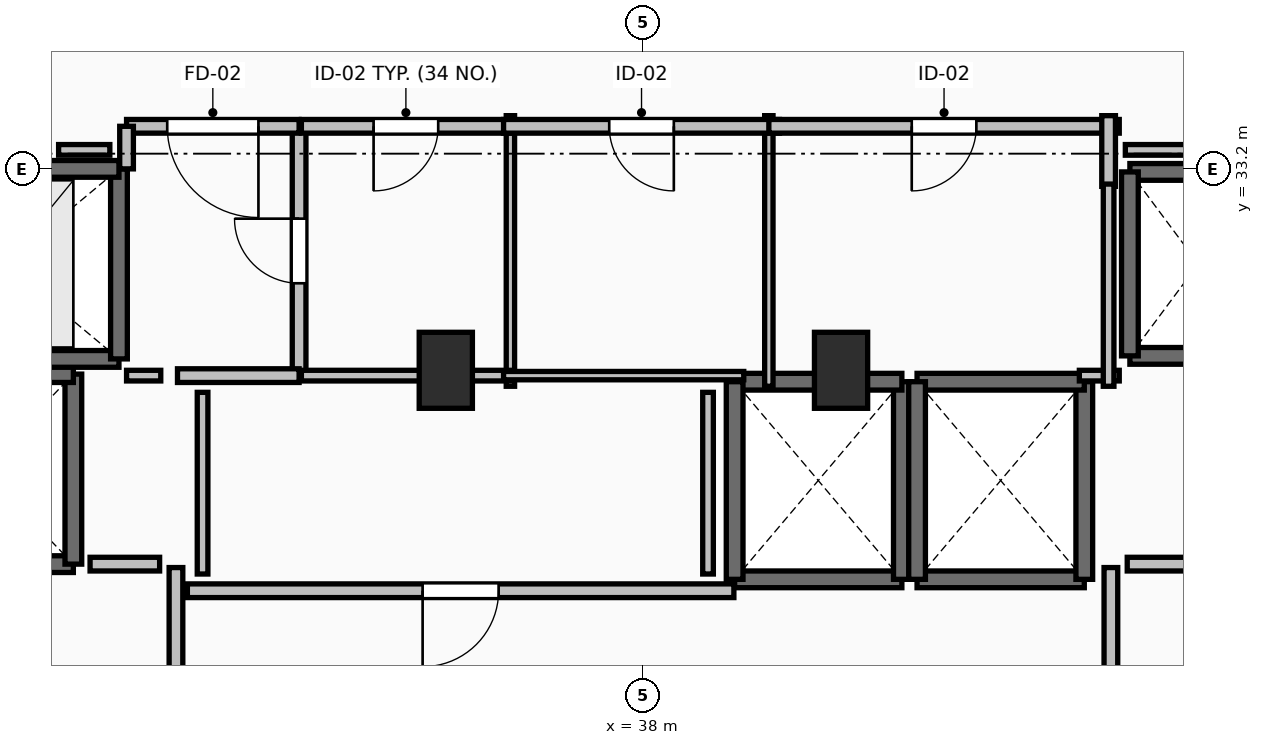
"""IFC4 building model, lengths in metres.
Left out: names, types, materials, properties, quantities, classifications, styles, units other than length and angle.
Written with IfcOpenShell. Run it as: python <this file> out.ifc"""

import sys

from ifc_helpers import new_model, si_unit, direction, frame, frame_2d, origin, origin_2d, place, context, subcontext, project, spatial, rectangle, extrude, element, fill, save


model = new_model("IFC4")
c1 = context("Model", 3, precision=1e-05, world=origin(), true_north=direction((0.0, 1.0)))
c2 = subcontext(c1, "Body", "Model", "MODEL_VIEW")
j1 = project(units=[si_unit("LENGTHUNIT", "METRE"), si_unit("PLANEANGLEUNIT", "RADIAN")], contexts=[c1])
p1 = place(None, origin())
s1 = spatial("IfcSite", under=j1, at=p1, CompositionType="ELEMENT")
p2 = place(p1, origin())
s2 = spatial("IfcBuilding", under=s1, at=p2, CompositionType="ELEMENT")
p3 = place(p2, frame((0.0, 0.0, 221.4)))
s3 = spatial("IfcBuildingStorey", under=s2, at=p3, CompositionType="ELEMENT", Elevation=221.4)
for number, where, z_axis, x_axis in (
    (1, (35.4, 30.55, 0.0), (0.0, 0.0, 1.0), (1.0, 0.0, 0.0)),
    (2, (40.6, 30.55, 0.0), (0.0, 0.0, 1.0), (1.0, 0.0, 0.0)),
):
    element("IfcColumn", number, at=place(p3, frame(where, z_axis=z_axis, x_axis=x_axis)), inside=s3, PredefinedType="PILASTER", context=c2, shape_type="SweptSolid", body=[
        extrude(rectangle(XDim=0.7, YDim=1.0, at=origin_2d()), origin(), (0.0, 0.0, 1.0), 3.55),
    ])
p4 = place(p3, frame((39.2, 27.8, 0.0), z_axis=(0.0, 0.0, 1.0), x_axis=(1.0, 0.0, 0.0)))
e3 = element("IfcWall", 3, at=p4, inside=s3, PredefinedType="SOLIDWALL", context=c2, shape_type="SweptSolid", body=[
    extrude(rectangle(XDim=2.2, YDim=0.22, at=frame_2d((1.1, 0.0))), origin(), (0.0, 0.0, 1.0), 3.2),
])
p5 = place(p3, frame((41.4, 27.8, 0.0), z_axis=(0.0, 0.0, 1.0), x_axis=(0.0, 1.0, 0.0)))
e4 = element("IfcWall", 4, at=p5, inside=s3, PredefinedType="SOLIDWALL", context=c2, shape_type="SweptSolid", body=[
    extrude(rectangle(XDim=2.6, YDim=0.22, at=frame_2d((1.3, 0.0))), origin(), (0.0, 0.0, 1.0), 3.2),
])
p6 = place(p3, frame((41.4, 30.4, 0.0), z_axis=(0.0, 0.0, 1.0), x_axis=(-1.0, 0.0, 0.0)))
e5 = element("IfcWall", 5, at=p6, inside=s3, PredefinedType="SOLIDWALL", context=c2, shape_type="SweptSolid", body=[
    extrude(rectangle(XDim=2.2, YDim=0.22, at=frame_2d((1.1, 0.0))), origin(), (0.0, 0.0, 1.0), 3.2),
])
p7 = place(p3, frame((39.2, 30.4, 0.0), z_axis=(0.0, 0.0, 1.0), x_axis=(0.0, -1.0, 0.0)))
e6 = element("IfcWall", 6, at=p7, inside=s3, PredefinedType="SOLIDWALL", context=c2, shape_type="SweptSolid", body=[
    extrude(rectangle(XDim=2.6, YDim=0.22, at=frame_2d((1.3, 0.0))), origin(), (0.0, 0.0, 1.0), 3.2),
])
p8 = place(p3, frame((41.6, 27.8, 0.0), z_axis=(0.0, 0.0, 1.0), x_axis=(1.0, 0.0, 0.0)))
e7 = element("IfcWall", 7, at=p8, inside=s3, PredefinedType="SOLIDWALL", context=c2, shape_type="SweptSolid", body=[
    extrude(rectangle(XDim=2.2, YDim=0.22, at=frame_2d((1.1, 0.0))), origin(), (0.0, 0.0, 1.0), 3.2),
])
p9 = place(p3, frame((43.8, 27.8, 0.0), z_axis=(0.0, 0.0, 1.0), x_axis=(0.0, 1.0, 0.0)))
e8 = element("IfcWall", 8, at=p9, inside=s3, PredefinedType="SOLIDWALL", context=c2, shape_type="SweptSolid", body=[
    extrude(rectangle(XDim=2.6, YDim=0.22, at=frame_2d((1.3, 0.0))), origin(), (0.0, 0.0, 1.0), 3.2),
])
p10 = place(p3, frame((43.8, 30.4, 0.0), z_axis=(0.0, 0.0, 1.0), x_axis=(-1.0, 0.0, 0.0)))
e9 = element("IfcWall", 9, at=p10, inside=s3, PredefinedType="SOLIDWALL", context=c2, shape_type="SweptSolid", body=[
    extrude(rectangle(XDim=2.2, YDim=0.22, at=frame_2d((1.1, 0.0))), origin(), (0.0, 0.0, 1.0), 3.2),
])
p11 = place(p3, frame((41.6, 30.4, 0.0), z_axis=(0.0, 0.0, 1.0), x_axis=(0.0, -1.0, 0.0)))
e10 = element("IfcWall", 10, at=p11, inside=s3, PredefinedType="SOLIDWALL", context=c2, shape_type="SweptSolid", body=[
    extrude(rectangle(XDim=2.6, YDim=0.22, at=frame_2d((1.3, 0.0))), origin(), (0.0, 0.0, 1.0), 3.2),
])
for number, where, z_axis, x_axis in (
    (11, (44.4, 30.74, 0.0), (0.0, 0.0, 1.0), (1.0, 0.0, 0.0)),
    (12, (46.2, 33.16, 0.0), (0.0, 0.0, 1.0), (-1.0, 0.0, 0.0)),
):
    element("IfcWall", number, at=place(p3, frame(where, z_axis=z_axis, x_axis=x_axis)), inside=s3, PredefinedType="SOLIDWALL", context=c2, shape_type="SweptSolid", body=[
        extrude(rectangle(XDim=1.8, YDim=0.22, at=frame_2d((0.9, 0.0))), origin(), (0.0, 0.0, 1.0), 3.2),
    ])
p12 = place(p3, frame((44.4, 33.16, 0.0), z_axis=(0.0, 0.0, 1.0), x_axis=(0.0, -1.0, 0.0)))
e13 = element("IfcWall", 13, at=p12, inside=s3, PredefinedType="SOLIDWALL", context=c2, shape_type="SweptSolid", body=[
    extrude(rectangle(XDim=2.42, YDim=0.22, at=frame_2d((1.21, 0.0))), origin(), (0.0, 0.0, 1.0), 3.2),
])
p13 = place(p3, frame((28.1, 28.0, 0.0), z_axis=(0.0, 0.0, 1.0), x_axis=(1.0, 0.0, 0.0)))
e14 = element("IfcWall", 14, at=p13, inside=s3, PredefinedType="SHEAR", context=c2, shape_type="SweptSolid", body=[
    extrude(rectangle(XDim=2.4, YDim=0.22, at=frame_2d((1.2, 0.0))), origin(), (0.0, 0.0, 1.0), 3.2),
])
p14 = place(p13, frame((0.6, 0.0, 0.0)))
e15 = element("IfcOpeningElement", 15, at=p14, cuts=e14, PredefinedType="OPENING", context=c2, shape_type="SweptSolid", body=[
    extrude(rectangle(XDim=1.2, YDim=2.2, at=frame_2d((0.6, 1.1))), frame((0.0, 0.125, 0.0), z_axis=(0.0, -1.0, 0.0), x_axis=(1.0, 0.0, 0.0)), (0.0, 0.0, 1.0), 0.25),
])
p15 = place(p3, frame((30.5, 28.0, 0.0), z_axis=(0.0, 0.0, 1.0), x_axis=(0.0, 1.0, 0.0)))
e16 = element("IfcWall", 16, at=p15, inside=s3, PredefinedType="SHEAR", context=c2, shape_type="SweptSolid", body=[
    extrude(rectangle(XDim=2.5, YDim=0.22, at=frame_2d((1.25, 0.0))), origin(), (0.0, 0.0, 1.0), 3.2),
])
p16 = place(p3, frame((30.5, 30.5, 0.0), z_axis=(0.0, 0.0, 1.0), x_axis=(-1.0, 0.0, 0.0)))
e17 = element("IfcWall", 17, at=p16, inside=s3, PredefinedType="SHEAR", context=c2, shape_type="SweptSolid", body=[
    extrude(rectangle(XDim=2.4, YDim=0.22, at=frame_2d((1.2, 0.0))), origin(), (0.0, 0.0, 1.0), 3.2),
])
p17 = place(p3, frame((28.1, 30.7, 0.0), z_axis=(0.0, 0.0, 1.0), x_axis=(1.0, 0.0, 0.0)))
e18 = element("IfcWall", 18, at=p17, inside=s3, PredefinedType="SOLIDWALL", context=c2, shape_type="SweptSolid", body=[
    extrude(rectangle(XDim=3.0, YDim=0.22, at=frame_2d((1.5, 0.0))), origin(), (0.0, 0.0, 1.0), 3.2),
])
p18 = place(p3, frame((31.1, 30.7, 0.0), z_axis=(0.0, 0.0, 1.0), x_axis=(0.0, 1.0, 0.0)))
e19 = element("IfcWall", 19, at=p18, inside=s3, PredefinedType="SOLIDWALL", context=c2, shape_type="SweptSolid", body=[
    extrude(rectangle(XDim=2.5, YDim=0.22, at=frame_2d((1.25, 0.0))), origin(), (0.0, 0.0, 1.0), 3.2),
])
p19 = place(p3, frame((31.1, 33.2, 0.0), z_axis=(0.0, 0.0, 1.0), x_axis=(-1.0, 0.0, 0.0)))
e20 = element("IfcWall", 20, at=p19, inside=s3, PredefinedType="SOLIDWALL", context=c2, shape_type="SweptSolid", body=[
    extrude(rectangle(XDim=3.0, YDim=0.22, at=frame_2d((1.5, 0.0))), origin(), (0.0, 0.0, 1.0), 3.2),
])
p20 = place(p19, frame((0.9, 0.0, 0.0)))
e21 = element("IfcOpeningElement", 21, at=p20, cuts=e20, PredefinedType="OPENING", context=c2, shape_type="SweptSolid", body=[
    extrude(rectangle(XDim=1.2, YDim=2.2, at=frame_2d((0.6, 1.1))), frame((0.0, 0.125, 0.0), z_axis=(0.0, -1.0, 0.0), x_axis=(1.0, 0.0, 0.0)), (0.0, 0.0, 1.0), 0.25),
])
p21 = place(p3, frame((31.85, 24.045, 0.0), z_axis=(0.0, 0.0, 1.0), x_axis=(0.0, 1.0, 0.0)))
e22 = element("IfcWall", 22, at=p21, inside=s3, PredefinedType="PARTITIONING", context=c2, shape_type="SweptSolid", body=[
    extrude(rectangle(XDim=3.91, YDim=0.18, at=frame_2d((1.955, 0.0))), origin(), (0.0, 0.0, 1.0), 3.2),
])
p22 = place(p21, frame((1.355, 0.0, 0.0)))
e23 = element("IfcOpeningElement", 23, at=p22, cuts=e22, PredefinedType="OPENING", context=c2, shape_type="SweptSolid", body=[
    extrude(rectangle(XDim=1.2, YDim=2.15, at=frame_2d((0.6, 1.075))), frame((0.0, 0.105, 0.0), z_axis=(0.0, -1.0, 0.0), x_axis=(1.0, 0.0, 0.0)), (0.0, 0.0, 1.0), 0.21),
])
p23 = place(p3, frame((44.15, 27.955, 0.0), z_axis=(0.0, 0.0, 1.0), x_axis=(0.0, -1.0, 0.0)))
e24 = element("IfcWall", 24, at=p23, inside=s3, PredefinedType="PARTITIONING", context=c2, shape_type="SweptSolid", body=[
    extrude(rectangle(XDim=3.91, YDim=0.18, at=frame_2d((1.955, 0.0))), origin(), (0.0, 0.0, 1.0), 3.2),
])
p24 = place(p23, frame((1.355, 0.0, 0.0)))
e25 = element("IfcOpeningElement", 25, at=p24, cuts=e24, PredefinedType="OPENING", context=c2, shape_type="SweptSolid", body=[
    extrude(rectangle(XDim=1.2, YDim=2.15, at=frame_2d((0.6, 1.075))), frame((0.0, 0.105, 0.0), z_axis=(0.0, -1.0, 0.0), x_axis=(1.0, 0.0, 0.0)), (0.0, 0.0, 1.0), 0.21),
])
p25 = place(p3, frame((33.47, 30.48, 0.0), z_axis=(0.0, 0.0, 1.0), x_axis=(0.0, 1.0, 0.0)))
e26 = element("IfcWall", 26, at=p25, inside=s3, PredefinedType="PARTITIONING", context=c2, shape_type="SweptSolid", body=[
    extrude(rectangle(XDim=3.28, YDim=0.18, at=frame_2d((1.64, 0.0))), origin(), (0.0, 0.0, 1.0), 3.2),
])
p26 = place(p25, frame((1.215, 0.0, 0.0)))
e27 = element("IfcOpeningElement", 27, at=p26, cuts=e26, PredefinedType="OPENING", context=c2, shape_type="SweptSolid", body=[
    extrude(rectangle(XDim=0.85, YDim=2.1, at=frame_2d((0.425, 1.05))), frame((0.0, 0.105, 0.0), z_axis=(0.0, -1.0, 0.0), x_axis=(1.0, 0.0, 0.0)), (0.0, 0.0, 1.0), 0.21),
])
p27 = place(p3, frame((31.87, 30.48, 0.0), z_axis=(0.0, 0.0, 1.0), x_axis=(1.0, 0.0, 0.0)))
e28 = element("IfcWall", 28, at=p27, inside=s3, PredefinedType="PARTITIONING", context=c2, shape_type="SweptSolid", body=[
    extrude(rectangle(XDim=1.6, YDim=0.18, at=frame_2d((0.8, 0.0))), origin(), (0.0, 0.0, 1.0), 3.2),
])
p28 = place(p3, frame((33.47, 33.76, 0.0), z_axis=(0.0, 0.0, 1.0), x_axis=(-1.0, 0.0, 0.0)))
e29 = element("IfcWall", 29, at=p28, inside=s3, PredefinedType="PARTITIONING", context=c2, shape_type="SweptSolid", body=[
    extrude(rectangle(XDim=2.27, YDim=0.18, at=frame_2d((1.135, 0.0))), origin(), (0.0, 0.0, 1.0), 3.2),
])
p29 = place(p28, frame((0.535, 0.0, 0.0)))
e30 = element("IfcOpeningElement", 30, at=p29, cuts=e29, PredefinedType="OPENING", context=c2, shape_type="SweptSolid", body=[
    extrude(rectangle(XDim=1.2, YDim=2.15, at=frame_2d((0.6, 1.075))), frame((0.0, 0.105, 0.0), z_axis=(0.0, -1.0, 0.0), x_axis=(1.0, 0.0, 0.0)), (0.0, 0.0, 1.0), 0.21),
])
p30 = place(p3, frame((31.2, 33.76, 0.0), z_axis=(0.0, 0.0, 1.0), x_axis=(0.0, -1.0, 0.0)))
e31 = element("IfcWall", 31, at=p30, inside=s3, PredefinedType="PARTITIONING", context=c2, shape_type="SweptSolid", body=[
    extrude(rectangle(XDim=0.56, YDim=0.18, at=frame_2d((0.28, 0.0))), origin(), (0.0, 0.0, 1.0), 3.2),
])
p31 = place(p3, frame((39.19, 27.65, 0.0), z_axis=(0.0, 0.0, 1.0), x_axis=(-1.0, 0.0, 0.0)))
e32 = element("IfcWall", 32, at=p31, inside=s3, PredefinedType="PARTITIONING", context=c2, shape_type="SweptSolid", body=[
    extrude(rectangle(XDim=7.19, YDim=0.18, at=frame_2d((3.595, 0.0))), origin(), (0.0, 0.0, 1.0), 3.2),
])
p32 = place(p31, frame((3.095, 0.0, 0.0)))
e33 = element("IfcOpeningElement", 33, at=p32, cuts=e32, PredefinedType="OPENING", context=c2, shape_type="SweptSolid", body=[
    extrude(rectangle(XDim=1.0, YDim=2.15, at=frame_2d((0.5, 1.075))), frame((0.0, 0.105, 0.0), z_axis=(0.0, -1.0, 0.0), x_axis=(1.0, 0.0, 0.0)), (0.0, 0.0, 1.0), 0.21),
])
p33 = place(p3, frame((36.25, 30.34, 0.0), z_axis=(0.0, 0.0, 1.0), x_axis=(0.0, 1.0, 0.0)))
e34 = element("IfcWall", 34, at=p33, inside=s3, PredefinedType="PARTITIONING", context=c2, shape_type="SweptSolid", body=[
    extrude(rectangle(XDim=3.56, YDim=0.11, at=frame_2d((1.78, 0.0))), origin(), (0.0, 0.0, 1.0), 2.392),
])
p34 = place(p3, frame((33.5, 30.48, 0.0), z_axis=(0.0, 0.0, 1.0), x_axis=(1.0, 0.0, 0.0)))
e35 = element("IfcWall", 35, at=p34, inside=s3, PredefinedType="PARTITIONING", context=c2, shape_type="SweptSolid", body=[
    extrude(rectangle(XDim=2.75, YDim=0.14, at=frame_2d((1.375, 0.0))), origin(), (0.0, 0.0, 1.0), 2.392),
])
p35 = place(p3, frame((36.25, 33.76, 0.0), z_axis=(0.0, 0.0, 1.0), x_axis=(-1.0, 0.0, 0.0)))
e36 = element("IfcWall", 36, at=p35, inside=s3, PredefinedType="PARTITIONING", context=c2, shape_type="SweptSolid", body=[
    extrude(rectangle(XDim=2.75, YDim=0.18, at=frame_2d((1.375, 0.0))), origin(), (0.0, 0.0, 1.0), 3.2),
])
p36 = place(p35, frame((0.95, 0.0, 0.0)))
e37 = element("IfcOpeningElement", 37, at=p36, cuts=e36, PredefinedType="OPENING", context=c2, shape_type="SweptSolid", body=[
    extrude(rectangle(XDim=0.85, YDim=2.1, at=frame_2d((0.425, 1.05))), frame((0.0, 0.105, 0.0), z_axis=(0.0, -1.0, 0.0), x_axis=(1.0, 0.0, 0.0)), (0.0, 0.0, 1.0), 0.21),
])
p37 = place(p3, frame((39.65, 30.34, 0.0), z_axis=(0.0, 0.0, 1.0), x_axis=(0.0, 1.0, 0.0)))
e38 = element("IfcWall", 38, at=p37, inside=s3, PredefinedType="PARTITIONING", context=c2, shape_type="SweptSolid", body=[
    extrude(rectangle(XDim=3.56, YDim=0.11, at=frame_2d((1.78, 0.0))), origin(), (0.0, 0.0, 1.0), 2.392),
])
p38 = place(p3, frame((36.16, 30.48, 0.0), z_axis=(0.0, 0.0, 1.0), x_axis=(1.0, 0.0, 0.0)))
e39 = element("IfcWall", 39, at=p38, inside=s3, PredefinedType="PARTITIONING", context=c2, shape_type="SweptSolid", body=[
    extrude(rectangle(XDim=3.16, YDim=0.11, at=frame_2d((1.58, 0.0))), origin(), (0.0, 0.0, 1.0), 2.392),
])
p39 = place(p3, frame((39.79, 33.76, 0.0), z_axis=(0.0, 0.0, 1.0), x_axis=(-1.0, 0.0, 0.0)))
e40 = element("IfcWall", 40, at=p39, inside=s3, PredefinedType="PARTITIONING", context=c2, shape_type="SweptSolid", body=[
    extrude(rectangle(XDim=3.63, YDim=0.18, at=frame_2d((1.815, 0.0))), origin(), (0.0, 0.0, 1.0), 3.2),
])
p40 = place(p39, frame((1.39, 0.0, 0.0)))
e41 = element("IfcOpeningElement", 41, at=p40, cuts=e40, PredefinedType="OPENING", context=c2, shape_type="SweptSolid", body=[
    extrude(rectangle(XDim=0.85, YDim=2.1, at=frame_2d((0.425, 1.05))), frame((0.0, 0.105, 0.0), z_axis=(0.0, -1.0, 0.0), x_axis=(1.0, 0.0, 0.0)), (0.0, 0.0, 1.0), 0.21),
])
p41 = place(p3, frame((44.26, 33.76, 0.0), z_axis=(0.0, 0.0, 1.0), x_axis=(-1.0, 0.0, 0.0)))
e42 = element("IfcWall", 42, at=p41, inside=s3, PredefinedType="PARTITIONING", context=c2, shape_type="SweptSolid", body=[
    extrude(rectangle(XDim=4.61, YDim=0.18, at=frame_2d((2.305, 0.0))), origin(), (0.0, 0.0, 1.0), 3.2),
])
p42 = place(p41, frame((1.88, 0.0, 0.0)))
e43 = element("IfcOpeningElement", 43, at=p42, cuts=e42, PredefinedType="OPENING", context=c2, shape_type="SweptSolid", body=[
    extrude(rectangle(XDim=0.85, YDim=2.1, at=frame_2d((0.425, 1.05))), frame((0.0, 0.105, 0.0), z_axis=(0.0, -1.0, 0.0), x_axis=(1.0, 0.0, 0.0)), (0.0, 0.0, 1.0), 0.21),
])
p43 = place(p3, frame((44.12, 32.97, 0.0), z_axis=(0.0, 0.0, 1.0), x_axis=(0.0, 1.0, 0.0)))
e44 = element("IfcWall", 44, at=p43, inside=s3, PredefinedType="PARTITIONING", context=c2, shape_type="SweptSolid", body=[
    extrude(rectangle(XDim=0.93, YDim=0.18, at=frame_2d((0.465, 0.0))), origin(), (0.0, 0.0, 1.0), 3.2),
])
for number, where, z_axis, x_axis in (
    (45, (31.635, 28.0, 0.0), (0.0, 0.0, 1.0), (-1.0, 0.0, 0.0)),
    (46, (45.28, 28.0, 0.0), (0.0, 0.0, 1.0), (-1.0, 0.0, 0.0)),
):
    element("IfcWall", number, at=place(p3, frame(where, z_axis=z_axis, x_axis=x_axis)), inside=s3, PredefinedType="PARTITIONING", context=c2, shape_type="SweptSolid", body=[
        extrude(rectangle(XDim=0.915, YDim=0.18, at=frame_2d((0.458, 0.0))), origin(), (0.0, 0.0, 1.0), 3.2),
    ])
p44 = place(p3, frame((31.2, 30.48, 0.0), z_axis=(0.0, 0.0, 1.0), x_axis=(1.0, 0.0, 0.0)))
e47 = element("IfcWall", 47, at=p44, inside=s3, PredefinedType="PARTITIONING", context=c2, shape_type="SweptSolid", body=[
    extrude(rectangle(XDim=0.45, YDim=0.14, at=frame_2d((0.225, 0.0))), origin(), (0.0, 0.0, 1.0), 3.2),
])
p45 = place(p3, frame((43.735, 30.48, 0.0), z_axis=(0.0, 0.0, 1.0), x_axis=(1.0, 0.0, 0.0)))
e48 = element("IfcWall", 48, at=p45, inside=s3, PredefinedType="PARTITIONING", context=c2, shape_type="SweptSolid", body=[
    extrude(rectangle(XDim=0.525, YDim=0.14, at=frame_2d((0.262, 0.0))), origin(), (0.0, 0.0, 1.0), 3.2),
])
p46 = place(p3, frame((44.12, 30.34, 0.0), z_axis=(0.0, 0.0, 1.0), x_axis=(0.0, 1.0, 0.0)))
e49 = element("IfcWall", 49, at=p46, inside=s3, PredefinedType="PARTITIONING", context=c2, shape_type="SweptSolid", body=[
    extrude(rectangle(XDim=2.66, YDim=0.14, at=frame_2d((1.33, 0.0))), origin(), (0.0, 0.0, 1.0), 3.2),
])
for number, where, z_axis, x_axis in (
    (50, (32.2, 30.26, 0.0), (0.0, 0.0, 1.0), (0.0, -1.0, 0.0)),
    (51, (38.85, 27.87, 0.0), (0.0, 0.0, 1.0), (0.0, 1.0, 0.0)),
):
    element("IfcWall", number, at=place(p3, frame(where, z_axis=z_axis, x_axis=x_axis)), inside=s3, PredefinedType="PARTITIONING", context=c2, shape_type="SweptSolid", body=[
        extrude(rectangle(XDim=2.39, YDim=0.14, at=frame_2d((1.195, 0.0))), origin(), (0.0, 0.0, 1.0), 3.2),
    ])
p47 = place(p3, frame((48.55, 33.45, 0.0), z_axis=(0.0, 0.0, 1.0), x_axis=(-1.0, 0.0, 0.0)))
e52 = element("IfcWall", 52, at=p47, inside=s3, PredefinedType="PARTITIONING", context=c2, shape_type="SweptSolid", body=[
    extrude(rectangle(XDim=4.21, YDim=0.14, at=frame_2d((2.105, 0.0))), origin(), (0.0, 0.0, 1.0), 2.392),
])
p48 = place(p3, frame((30.98, 33.45, 0.0), z_axis=(0.0, 0.0, 1.0), x_axis=(-1.0, 0.0, 0.0)))
e53 = element("IfcWall", 53, at=p48, inside=s3, PredefinedType="PARTITIONING", context=c2, shape_type="SweptSolid", body=[
    extrude(rectangle(XDim=0.674, YDim=0.14, at=frame_2d((0.337, 0.0))), origin(), (0.0, 0.0, 1.0), 3.2),
])
p49 = place(p26, origin())
e54 = element("IfcDoor", 54, at=p49, inside=s3, OperationType="SINGLE_SWING_RIGHT", PredefinedType="DOOR", context=c2, shape_type="SweptSolid", body=[
    extrude(rectangle(XDim=0.85, YDim=2.1, at=frame_2d((0.425, 1.05))), frame((0.0, 0.025, 0.0), z_axis=(0.0, -1.0, 0.0), x_axis=(1.0, 0.0, 0.0)), (0.0, 0.0, 1.0), 0.05),
])
fill(e27, e54)
p50 = place(p29, origin())
e55 = element("IfcDoor", 55, at=p50, inside=s3, OperationType="SINGLE_SWING_LEFT", PredefinedType="DOOR", context=c2, shape_type="SweptSolid", body=[
    extrude(rectangle(XDim=1.2, YDim=2.15, at=frame_2d((0.6, 1.075))), frame((0.0, 0.025, 0.0), z_axis=(0.0, -1.0, 0.0), x_axis=(1.0, 0.0, 0.0)), (0.0, 0.0, 1.0), 0.05),
])
fill(e30, e55)
p51 = place(p32, origin())
e56 = element("IfcDoor", 56, at=p51, inside=s3, OperationType="SINGLE_SWING_RIGHT", PredefinedType="DOOR", context=c2, shape_type="SweptSolid", body=[
    extrude(rectangle(XDim=1.0, YDim=2.15, at=frame_2d((0.5, 1.075))), frame((0.0, 0.025, 0.0), z_axis=(0.0, -1.0, 0.0), x_axis=(1.0, 0.0, 0.0)), (0.0, 0.0, 1.0), 0.05),
])
fill(e33, e56)
p52 = place(p36, origin())
e57 = element("IfcDoor", 57, at=p52, inside=s3, OperationType="SINGLE_SWING_RIGHT", PredefinedType="DOOR", context=c2, shape_type="SweptSolid", body=[
    extrude(rectangle(XDim=0.85, YDim=2.1, at=frame_2d((0.425, 1.05))), frame((0.0, 0.025, 0.0), z_axis=(0.0, -1.0, 0.0), x_axis=(1.0, 0.0, 0.0)), (0.0, 0.0, 1.0), 0.05),
])
fill(e37, e57)
p53 = place(p40, origin())
e58 = element("IfcDoor", 58, at=p53, inside=s3, OperationType="SINGLE_SWING_LEFT", PredefinedType="DOOR", context=c2, shape_type="SweptSolid", body=[
    extrude(rectangle(XDim=0.85, YDim=2.1, at=frame_2d((0.425, 1.05))), frame((0.0, 0.025, 0.0), z_axis=(0.0, -1.0, 0.0), x_axis=(1.0, 0.0, 0.0)), (0.0, 0.0, 1.0), 0.05),
])
fill(e41, e58)
p54 = place(p42, origin())
e59 = element("IfcDoor", 59, at=p54, inside=s3, OperationType="SINGLE_SWING_RIGHT", PredefinedType="DOOR", context=c2, shape_type="SweptSolid", body=[
    extrude(rectangle(XDim=0.85, YDim=2.1, at=frame_2d((0.425, 1.05))), frame((0.0, 0.025, 0.0), z_axis=(0.0, -1.0, 0.0), x_axis=(1.0, 0.0, 0.0)), (0.0, 0.0, 1.0), 0.05),
])
fill(e43, e59)
save(model, sys.argv[1])
